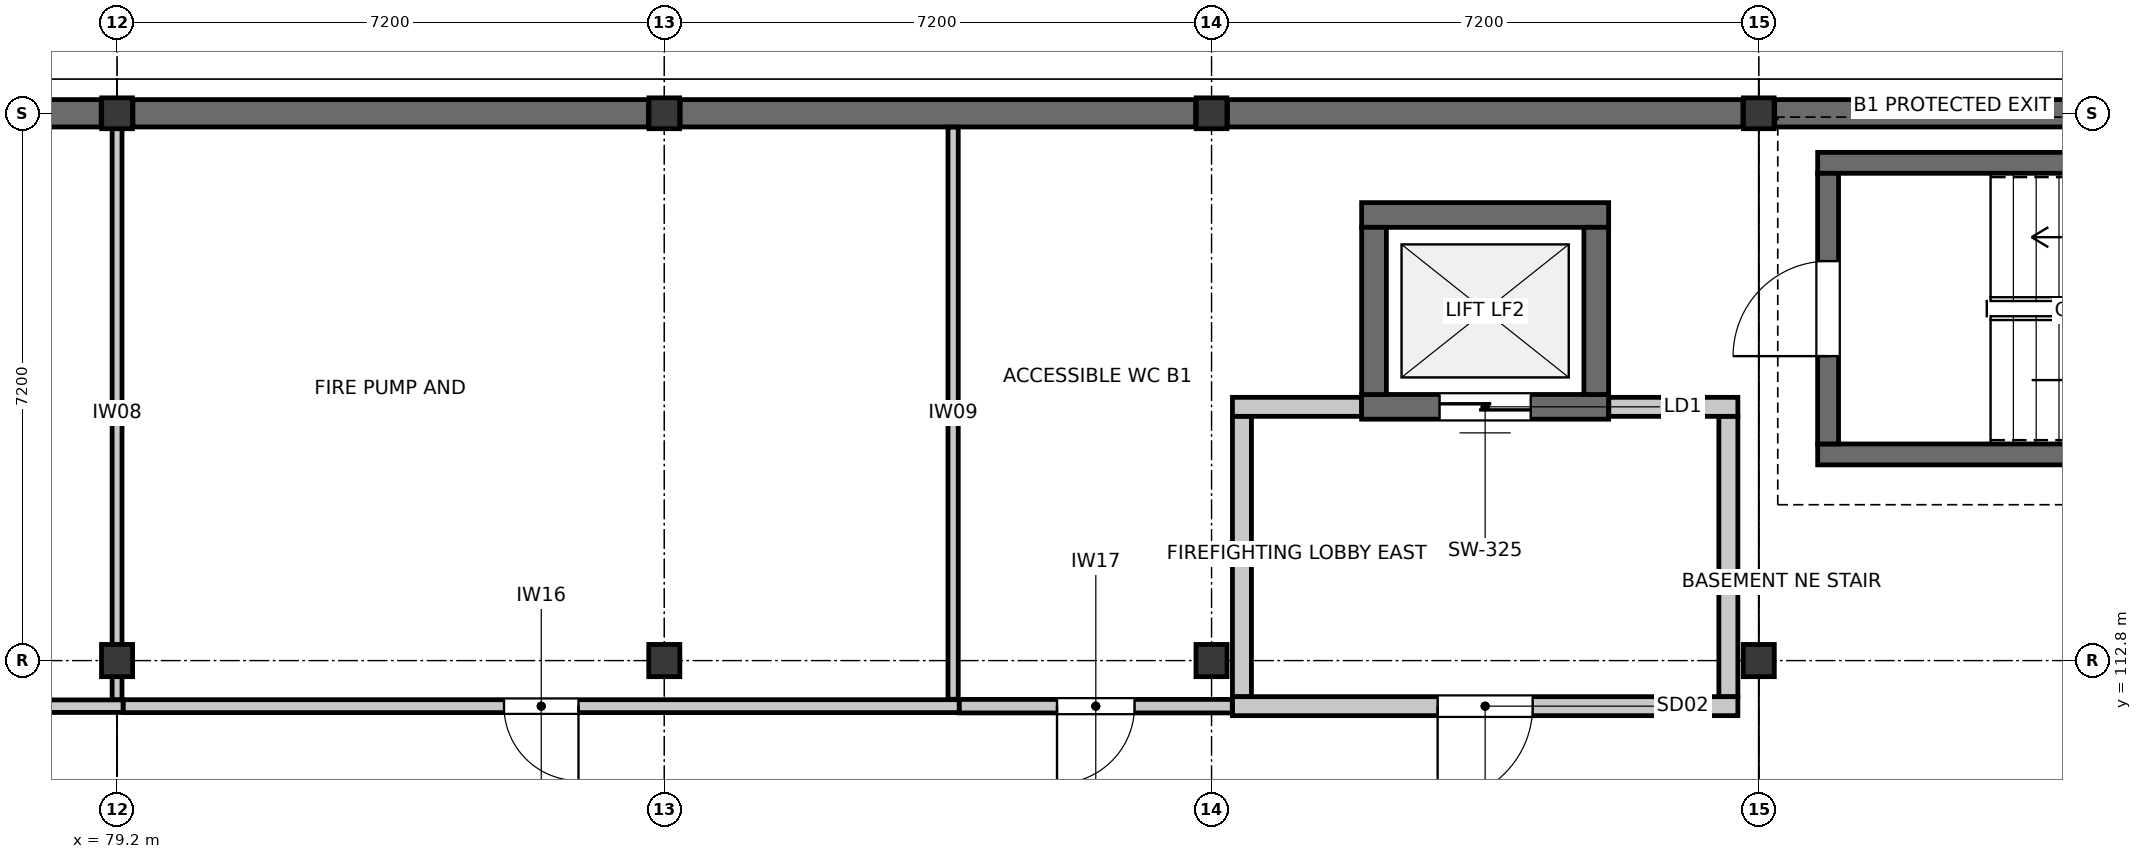
"""IFC4 building model, lengths in metres.
Left out: names, types, materials, properties, quantities, classifications, styles, units other than length and angle.
Written with IfcOpenShell. Run it as: python <this file> out.ifc"""

import sys

from ifc_helpers import new_model, si_unit, direction, frame, frame_2d, origin, origin_2d, place, context, subcontext, project, spatial, rectangle, i_section, extrude, element, fill, save


model = new_model("IFC4")
c1 = context("Model", 3, precision=1e-05, world=origin(), true_north=direction((0.0, 1.0)))
c2 = subcontext(c1, "Body", "Model", "MODEL_VIEW")
j1 = project(units=[si_unit("LENGTHUNIT", "METRE"), si_unit("PLANEANGLEUNIT", "RADIAN")], contexts=[c1])
p1 = place(None, origin())
s1 = spatial("IfcSite", under=j1, at=p1, CompositionType="ELEMENT")
p2 = place(p1, origin())
s2 = spatial("IfcBuilding", under=s1, at=p2, CompositionType="ELEMENT")
p3 = place(p2, frame((0.0, 0.0, -4.5)))
s3 = spatial("IfcBuildingStorey", under=s2, at=p3, CompositionType="ELEMENT", Elevation=-4.5)
p4 = place(p3, frame((79.2, 112.8, 0.0), z_axis=(0.0, 0.0, 1.0), x_axis=(1.0, 0.0, 0.0)))
e1 = element("IfcColumn", 1, at=p4, inside=s3, PredefinedType="COLUMN", context=c2, shape_type="SweptSolid", body=[
    extrude(i_section(OverallWidth=0.409, OverallDepth=0.424, WebThickness=0.033, FlangeThickness=0.052, FilletRadius=0.015, at=origin_2d()), origin(), (0.0, 0.0, 1.0), 4.5),
])
p5 = place(p3, frame((79.2, 120.0, 0.0), z_axis=(0.0, 0.0, 1.0), x_axis=(1.0, 0.0, 0.0)))
e2 = element("IfcColumn", 2, at=p5, inside=s3, PredefinedType="COLUMN", context=c2, shape_type="SweptSolid", body=[
    extrude(i_section(OverallWidth=0.404, OverallDepth=0.406, WebThickness=0.027, FlangeThickness=0.044, FilletRadius=0.015, at=origin_2d()), origin(), (0.0, 0.0, 1.0), 4.5),
])
p6 = place(p3, frame((86.4, 112.8, 0.0), z_axis=(0.0, 0.0, 1.0), x_axis=(1.0, 0.0, 0.0)))
e3 = element("IfcColumn", 3, at=p6, inside=s3, PredefinedType="COLUMN", context=c2, shape_type="SweptSolid", body=[
    extrude(i_section(OverallWidth=0.409, OverallDepth=0.424, WebThickness=0.033, FlangeThickness=0.052, FilletRadius=0.015, at=origin_2d()), origin(), (0.0, 0.0, 1.0), 4.5),
])
p7 = place(p3, frame((86.4, 120.0, 0.0), z_axis=(0.0, 0.0, 1.0), x_axis=(1.0, 0.0, 0.0)))
e4 = element("IfcColumn", 4, at=p7, inside=s3, PredefinedType="COLUMN", context=c2, shape_type="SweptSolid", body=[
    extrude(i_section(OverallWidth=0.404, OverallDepth=0.406, WebThickness=0.027, FlangeThickness=0.044, FilletRadius=0.015, at=origin_2d()), origin(), (0.0, 0.0, 1.0), 4.5),
])
p8 = place(p3, frame((93.6, 112.8, 0.0), z_axis=(0.0, 0.0, 1.0), x_axis=(1.0, 0.0, 0.0)))
e5 = element("IfcColumn", 5, at=p8, inside=s3, PredefinedType="COLUMN", context=c2, shape_type="SweptSolid", body=[
    extrude(i_section(OverallWidth=0.409, OverallDepth=0.424, WebThickness=0.033, FlangeThickness=0.052, FilletRadius=0.015, at=origin_2d()), origin(), (0.0, 0.0, 1.0), 4.5),
])
p9 = place(p3, frame((93.6, 120.0, 0.0), z_axis=(0.0, 0.0, 1.0), x_axis=(1.0, 0.0, 0.0)))
e6 = element("IfcColumn", 6, at=p9, inside=s3, PredefinedType="COLUMN", context=c2, shape_type="SweptSolid", body=[
    extrude(i_section(OverallWidth=0.404, OverallDepth=0.406, WebThickness=0.027, FlangeThickness=0.044, FilletRadius=0.015, at=origin_2d()), origin(), (0.0, 0.0, 1.0), 4.5),
])
p10 = place(p3, frame((100.8, 112.8, 0.0), z_axis=(0.0, 0.0, 1.0), x_axis=(1.0, 0.0, 0.0)))
e7 = element("IfcColumn", 7, at=p10, inside=s3, PredefinedType="COLUMN", context=c2, shape_type="SweptSolid", body=[
    extrude(i_section(OverallWidth=0.409, OverallDepth=0.424, WebThickness=0.033, FlangeThickness=0.052, FilletRadius=0.015, at=origin_2d()), origin(), (0.0, 0.0, 1.0), 4.5),
])
p11 = place(p3, frame((100.8, 120.0, 0.0), z_axis=(0.0, 0.0, 1.0), x_axis=(1.0, 0.0, 0.0)))
e8 = element("IfcColumn", 8, at=p11, inside=s3, PredefinedType="COLUMN", context=c2, shape_type="SweptSolid", body=[
    extrude(i_section(OverallWidth=0.404, OverallDepth=0.406, WebThickness=0.027, FlangeThickness=0.044, FilletRadius=0.015, at=origin_2d()), origin(), (0.0, 0.0, 1.0), 4.5),
])
for number, where, z_axis, x_axis in (
    (9, (72.209, 120.0, 0.0), (0.0, 0.0, 1.0), (1.0, 0.0, 0.0)),
    (10, (79.409, 120.0, 0.0), (0.0, 0.0, 1.0), (1.0, 0.0, 0.0)),
):
    element("IfcWall", number, at=place(p3, frame(where, z_axis=z_axis, x_axis=x_axis)), inside=s3, PredefinedType="SOLIDWALL", context=c2, shape_type="SweptSolid", body=[
        extrude(rectangle(XDim=6.782, YDim=0.36, at=frame_2d((3.391, 0.0))), origin(), (0.0, 0.0, 1.0), 3.448),
    ])
p12 = place(p3, frame((86.609, 120.0, 0.0), z_axis=(0.0, 0.0, 1.0), x_axis=(1.0, 0.0, 0.0)))
e11 = element("IfcWall", 11, at=p12, inside=s3, PredefinedType="SOLIDWALL", context=c2, shape_type="SweptSolid", body=[
    extrude(rectangle(XDim=6.782, YDim=0.36, at=frame_2d((3.391, 0.0))), origin(), (0.0, 0.0, 1.0), 3.448),
])
for number, where, z_axis, x_axis in (
    (12, (93.809, 120.0, 0.0), (0.0, 0.0, 1.0), (1.0, 0.0, 0.0)),
    (13, (101.009, 120.0, 0.0), (0.0, 0.0, 1.0), (1.0, 0.0, 0.0)),
):
    element("IfcWall", number, at=place(p3, frame(where, z_axis=z_axis, x_axis=x_axis)), inside=s3, PredefinedType="SOLIDWALL", context=c2, shape_type="SweptSolid", body=[
        extrude(rectangle(XDim=6.782, YDim=0.36, at=frame_2d((3.391, 0.0))), origin(), (0.0, 0.0, 1.0), 3.448),
    ])
for number, where, z_axis, x_axis in (
    (14, (110.475, 115.512, 0.0), (0.0, 0.0, 1.0), (-1.0, 0.0, 0.0)),
    (15, (101.575, 119.348, 0.0), (0.0, 0.0, 1.0), (1.0, 0.0, 0.0)),
):
    element("IfcWall", number, at=place(p3, frame(where, z_axis=z_axis, x_axis=x_axis)), inside=s3, PredefinedType="SOLIDWALL", context=c2, shape_type="SweptSolid", body=[
        extrude(rectangle(XDim=8.9, YDim=0.275, at=frame_2d((4.45, 0.0))), origin(), (0.0, 0.0, 1.0), 4.22),
    ])
p13 = place(p3, frame((101.712, 115.65, 0.0), z_axis=(0.0, 0.0, 1.0), x_axis=(0.0, 1.0, 0.0)))
e16 = element("IfcWall", 16, at=p13, inside=s3, PredefinedType="SOLIDWALL", context=c2, shape_type="SweptSolid", body=[
    extrude(rectangle(XDim=3.56, YDim=0.275, at=frame_2d((1.78, 0.0))), origin(), (0.0, 0.0, 1.0), 4.22),
])
p14 = place(p13, frame((1.155, 0.0, 0.0)))
e17 = element("IfcOpeningElement", 17, at=p14, cuts=e16, PredefinedType="OPENING", context=c2, shape_type="SweptSolid", body=[
    extrude(rectangle(XDim=1.25, YDim=2.2, at=frame_2d((0.625, 1.1))), frame((0.0, 0.147, 0.0), z_axis=(0.0, -1.0, 0.0), x_axis=(1.0, 0.0, 0.0)), (0.0, 0.0, 1.0), 0.295),
])
p15 = place(p3, frame((98.825, 116.138, 0.0), z_axis=(0.0, 0.0, 1.0), x_axis=(-1.0, 0.0, 0.0)))
e18 = element("IfcWall", 18, at=p15, inside=s3, PredefinedType="SHEAR", context=c2, shape_type="SweptSolid", body=[
    extrude(rectangle(XDim=3.25, YDim=0.325, at=frame_2d((1.625, 0.0))), origin(), (0.0, 0.0, 1.0), 4.22),
])
p16 = place(p15, frame((1.025, 0.0, 0.0)))
e19 = element("IfcOpeningElement", 19, at=p16, cuts=e18, PredefinedType="OPENING", context=c2, shape_type="SweptSolid", body=[
    extrude(rectangle(XDim=1.2, YDim=2.2, at=frame_2d((0.6, 1.1))), frame((0.0, 0.172, 0.0), z_axis=(0.0, -1.0, 0.0), x_axis=(1.0, 0.0, 0.0)), (0.0, 0.0, 1.0), 0.345),
])
p17 = place(p3, frame((95.575, 118.662, 0.0), z_axis=(0.0, 0.0, 1.0), x_axis=(1.0, 0.0, 0.0)))
e20 = element("IfcWall", 20, at=p17, inside=s3, PredefinedType="SHEAR", context=c2, shape_type="SweptSolid", body=[
    extrude(rectangle(XDim=3.25, YDim=0.325, at=frame_2d((1.625, 0.0))), origin(), (0.0, 0.0, 1.0), 4.22),
])
for number, where, z_axis, x_axis in (
    (21, (95.738, 116.3, 0.0), (0.0, 0.0, 1.0), (0.0, 1.0, 0.0)),
    (22, (98.662, 118.5, 0.0), (0.0, 0.0, 1.0), (0.0, -1.0, 0.0)),
):
    element("IfcWall", number, at=place(p3, frame(where, z_axis=z_axis, x_axis=x_axis)), inside=s3, PredefinedType="SHEAR", context=c2, shape_type="SweptSolid", body=[
        extrude(rectangle(XDim=2.2, YDim=0.325, at=frame_2d((1.1, 0.0))), origin(), (0.0, 0.0, 1.0), 4.22),
    ])
p18 = place(p3, frame((100.525, 112.2, 0.0), z_axis=(0.0, 0.0, 1.0), x_axis=(-1.0, 0.0, 0.0)))
e23 = element("IfcWall", 23, at=p18, inside=s3, PredefinedType="PARTITIONING", context=c2, shape_type="SweptSolid", body=[
    extrude(rectangle(XDim=6.65, YDim=0.25, at=frame_2d((3.325, 0.0))), origin(), (0.0, 0.0, 1.0), 3.443),
])
p19 = place(p18, frame((2.7, 0.0, 0.0)))
e24 = element("IfcOpeningElement", 24, at=p19, cuts=e23, PredefinedType="OPENING", context=c2, shape_type="SweptSolid", body=[
    extrude(rectangle(XDim=1.25, YDim=2.2, at=frame_2d((0.625, 1.1))), frame((0.0, 0.135, 0.0), z_axis=(0.0, -1.0, 0.0), x_axis=(1.0, 0.0, 0.0)), (0.0, 0.0, 1.0), 0.27),
])
for number, where, z_axis, x_axis in (
    (25, (93.875, 116.138, 0.0), (0.0, 0.0, 1.0), (1.0, 0.0, 0.0)),
    (26, (98.827, 116.138, 0.0), (0.0, 0.0, 1.0), (1.0, 0.0, 0.0)),
):
    element("IfcWall", number, at=place(p3, frame(where, z_axis=z_axis, x_axis=x_axis)), inside=s3, PredefinedType="PARTITIONING", context=c2, shape_type="SweptSolid", body=[
        extrude(rectangle(XDim=1.698, YDim=0.25, at=frame_2d((0.849, 0.0))), origin(), (0.0, 0.0, 1.0), 3.443),
    ])
for number, where, z_axis, x_axis in (
    (27, (94.0, 112.327, 0.0), (0.0, 0.0, 1.0), (0.0, 1.0, 0.0)),
    (28, (100.4, 116.011, 0.0), (0.0, 0.0, 1.0), (0.0, -1.0, 0.0)),
):
    element("IfcWall", number, at=place(p3, frame(where, z_axis=z_axis, x_axis=x_axis)), inside=s3, PredefinedType="PARTITIONING", context=c2, shape_type="SweptSolid", body=[
        extrude(rectangle(XDim=3.684, YDim=0.25, at=frame_2d((1.842, 0.0))), origin(), (0.0, 0.0, 1.0), 3.443),
    ])
p20 = place(p3, frame((79.28, 112.2, 0.0), z_axis=(0.0, 0.0, 1.0), x_axis=(-1.0, 0.0, 0.0)))
e29 = element("IfcWall", 29, at=p20, inside=s3, PredefinedType="PARTITIONING", context=c2, shape_type="SweptSolid", body=[
    extrude(rectangle(XDim=14.753, YDim=0.165, at=frame_2d((7.376, 0.0))), origin(), (0.0, 0.0, 1.0), 3.443),
])
p21 = place(p20, frame((7.906, 0.0, 0.0)))
e30 = element("IfcOpeningElement", 30, at=p21, cuts=e29, PredefinedType="OPENING", context=c2, shape_type="SweptSolid", body=[
    extrude(rectangle(XDim=0.94, YDim=2.1, at=frame_2d((0.47, 1.05))), frame((0.0, 0.093, 0.0), z_axis=(0.0, -1.0, 0.0), x_axis=(1.0, 0.0, 0.0)), (0.0, 0.0, 1.0), 0.185),
])
p22 = place(p3, frame((90.28, 112.2, 0.0), z_axis=(0.0, 0.0, 1.0), x_axis=(-1.0, 0.0, 0.0)))
e31 = element("IfcWall", 31, at=p22, inside=s3, PredefinedType="PARTITIONING", context=c2, shape_type="SweptSolid", body=[
    extrude(rectangle(XDim=10.998, YDim=0.17, at=frame_2d((5.499, 0.0))), origin(), (0.0, 0.0, 1.0), 3.443),
])
p23 = place(p22, frame((5.009, 0.0, 0.0)))
e32 = element("IfcOpeningElement", 32, at=p23, cuts=e31, PredefinedType="OPENING", context=c2, shape_type="SweptSolid", body=[
    extrude(rectangle(XDim=0.98, YDim=2.1, at=frame_2d((0.49, 1.05))), frame((0.0, 0.095, 0.0), z_axis=(0.0, -1.0, 0.0), x_axis=(1.0, 0.0, 0.0)), (0.0, 0.0, 1.0), 0.19),
])
p24 = place(p3, frame((93.873, 112.2, 0.0), z_axis=(0.0, 0.0, 1.0), x_axis=(-1.0, 0.0, 0.0)))
e33 = element("IfcWall", 33, at=p24, inside=s3, PredefinedType="PARTITIONING", context=c2, shape_type="SweptSolid", body=[
    extrude(rectangle(XDim=3.591, YDim=0.178, at=frame_2d((1.795, 0.0))), origin(), (0.0, 0.0, 1.0), 3.443),
])
p25 = place(p24, frame((1.286, 0.0, 0.0)))
e34 = element("IfcOpeningElement", 34, at=p25, cuts=e33, PredefinedType="OPENING", context=c2, shape_type="SweptSolid", body=[
    extrude(rectangle(XDim=1.02, YDim=2.1, at=frame_2d((0.51, 1.05))), frame((0.0, 0.099, 0.0), z_axis=(0.0, -1.0, 0.0), x_axis=(1.0, 0.0, 0.0)), (0.0, 0.0, 1.0), 0.198),
])
p26 = place(p3, frame((79.2, 119.818, 0.0), z_axis=(0.0, 0.0, 1.0), x_axis=(0.0, -1.0, 0.0)))
e35 = element("IfcWall", 35, at=p26, inside=s3, PredefinedType="PARTITIONING", context=c2, shape_type="SweptSolid", body=[
    extrude(rectangle(XDim=7.531, YDim=0.13, at=frame_2d((3.766, 0.0))), origin(), (0.0, 0.0, 1.0), 3.443),
])
p27 = place(p3, frame((90.2, 119.818, 0.0), z_axis=(0.0, 0.0, 1.0), x_axis=(0.0, -1.0, 0.0)))
e36 = element("IfcWall", 36, at=p27, inside=s3, PredefinedType="PARTITIONING", context=c2, shape_type="SweptSolid", body=[
    extrude(rectangle(XDim=7.527, YDim=0.135, at=frame_2d((3.764, 0.0))), origin(), (0.0, 0.0, 1.0), 3.443),
])
p28 = place(p14, origin())
e37 = element("IfcDoor", 37, at=p28, inside=s3, OperationType="SINGLE_SWING_LEFT", PredefinedType="DOOR", context=c2, shape_type="SweptSolid", body=[
    extrude(rectangle(XDim=1.25, YDim=2.2, at=frame_2d((0.625, 1.1))), frame((0.0, 0.025, 0.0), z_axis=(0.0, -1.0, 0.0), x_axis=(1.0, 0.0, 0.0)), (0.0, 0.0, 1.0), 0.05),
])
fill(e17, e37)
p29 = place(p16, origin())
e38 = element("IfcDoor", 38, at=p29, inside=s3, OperationType="DOUBLE_DOOR_SLIDING", PredefinedType="DOOR", context=c2, shape_type="SweptSolid", body=[
    extrude(rectangle(XDim=1.2, YDim=2.2, at=frame_2d((0.6, 1.1))), frame((0.0, 0.025, 0.0), z_axis=(0.0, -1.0, 0.0), x_axis=(1.0, 0.0, 0.0)), (0.0, 0.0, 1.0), 0.05),
])
fill(e19, e38)
p30 = place(p19, origin())
e39 = element("IfcDoor", 39, at=p30, inside=s3, OperationType="SINGLE_SWING_RIGHT", PredefinedType="DOOR", context=c2, shape_type="SweptSolid", body=[
    extrude(rectangle(XDim=1.25, YDim=2.2, at=frame_2d((0.625, 1.1))), frame((0.0, 0.025, 0.0), z_axis=(0.0, -1.0, 0.0), x_axis=(1.0, 0.0, 0.0)), (0.0, 0.0, 1.0), 0.05),
])
fill(e24, e39)
p31 = place(p23, origin())
e40 = element("IfcDoor", 40, at=p31, inside=s3, OperationType="SINGLE_SWING_LEFT", PredefinedType="DOOR", context=c2, shape_type="SweptSolid", body=[
    extrude(rectangle(XDim=0.98, YDim=2.1, at=frame_2d((0.49, 1.05))), frame((0.0, 0.025, 0.0), z_axis=(0.0, -1.0, 0.0), x_axis=(1.0, 0.0, 0.0)), (0.0, 0.0, 1.0), 0.05),
])
fill(e32, e40)
p32 = place(p25, origin())
e41 = element("IfcDoor", 41, at=p32, inside=s3, OperationType="SINGLE_SWING_RIGHT", PredefinedType="DOOR", context=c2, shape_type="SweptSolid", body=[
    extrude(rectangle(XDim=1.02, YDim=2.1, at=frame_2d((0.51, 1.05))), frame((0.0, 0.025, 0.0), z_axis=(0.0, -1.0, 0.0), x_axis=(1.0, 0.0, 0.0)), (0.0, 0.0, 1.0), 0.05),
])
fill(e34, e41)
save(model, sys.argv[1])
